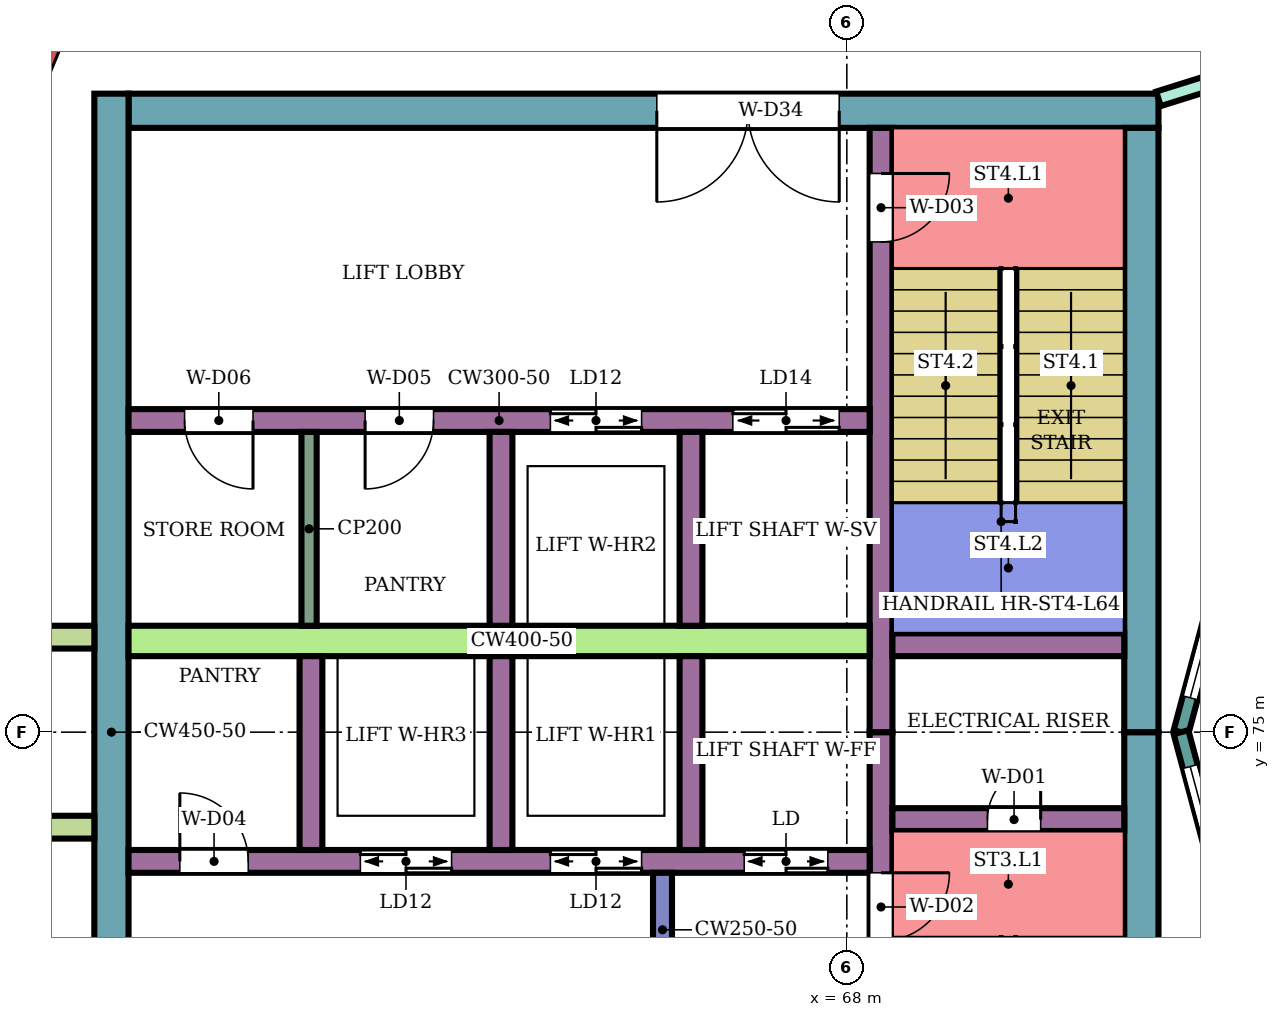
"""IFC4 building model, lengths in metres.
Left out: names, types, materials, properties, quantities, classifications, styles, units other than length and angle.
Written with IfcOpenShell. Run it as: python <this file> out.ifc"""

import sys

from ifc_helpers import new_model, si_unit, direction, frame, frame_2d, origin, place, context, subcontext, project, spatial, rectangle, extrude, element, fill, save


model = new_model("IFC4")
c1 = context("Model", 3, precision=1e-05, world=origin(), true_north=direction((0.0, 1.0)))
c2 = subcontext(c1, "Body", "Model", "MODEL_VIEW")
j1 = project(units=[si_unit("LENGTHUNIT", "METRE"), si_unit("PLANEANGLEUNIT", "RADIAN")], contexts=[c1])
p1 = place(None, origin())
s1 = spatial("IfcSite", under=j1, at=p1, CompositionType="ELEMENT")
p2 = place(p1, origin())
s2 = spatial("IfcBuilding", under=s1, at=p2, CompositionType="ELEMENT")
p3 = place(p2, frame((0.0, 0.0, 279.9)))
s3 = spatial("IfcBuildingStorey", under=s2, at=p3, CompositionType="ELEMENT", Elevation=279.9)
p4 = place(p3, frame((72.1, 83.175, 0.0), z_axis=(0.0, 0.0, 1.0), x_axis=(-1.0, 0.0, 0.0)))
e1 = element("IfcWall", 1, at=p4, inside=s3, PredefinedType="SHEAR", context=c2, shape_type="SweptSolid", body=[
    extrude(rectangle(XDim=13.55, YDim=0.45, at=frame_2d((6.775, 0.0))), origin(), (0.0, 0.0, 1.0), 3.88),
])
p5 = place(p4, frame((4.2, 0.0, 0.0)))
e2 = element("IfcOpeningElement", 2, at=p5, cuts=e1, PredefinedType="OPENING", context=c2, shape_type="SweptSolid", body=[
    extrude(rectangle(XDim=2.4, YDim=2.4, at=frame_2d((1.2, 1.2))), frame((0.0, 0.235, 0.0), z_axis=(0.0, -1.0, 0.0), x_axis=(1.0, 0.0, 0.0)), (0.0, 0.0, 1.0), 0.47),
])
for number, where, z_axis, x_axis in (
    (3, (71.875, 75.0, 0.0), (0.0, 0.0, 1.0), (0.0, -1.0, 0.0)),
    (4, (71.875, 82.95, 0.0), (0.0, 0.0, 1.0), (0.0, -1.0, 0.0)),
):
    element("IfcWall", number, at=place(p3, frame(where, z_axis=z_axis, x_axis=x_axis)), inside=s3, PredefinedType="SHEAR", context=c2, shape_type="SweptSolid", body=[
        extrude(rectangle(XDim=7.95, YDim=0.45, at=frame_2d((3.975, 0.0))), origin(), (0.0, 0.0, 1.0), 3.88),
    ])
p6 = place(p3, frame((58.325, 83.4, 0.0), z_axis=(0.0, 0.0, 1.0), x_axis=(0.0, -1.0, 0.0)))
e5 = element("IfcWall", 5, at=p6, inside=s3, PredefinedType="SHEAR", context=c2, shape_type="SweptSolid", body=[
    extrude(rectangle(XDim=16.8, YDim=0.45, at=frame_2d((8.4, 0.0))), origin(), (0.0, 0.0, 1.0), 3.88),
])
p7 = place(p3, frame((68.45, 75.0, 0.0), z_axis=(0.0, 0.0, 1.0), x_axis=(0.0, -1.0, 0.0)))
e6 = element("IfcWall", 6, at=p7, inside=s3, PredefinedType="SHEAR", context=c2, shape_type="SweptSolid", body=[
    extrude(rectangle(XDim=7.95, YDim=0.3, at=frame_2d((3.975, 0.0))), origin(), (0.0, 0.0, 1.0), 3.88),
])
p8 = place(p7, frame((1.85, 0.0, 0.0)))
e7 = element("IfcOpeningElement", 7, at=p8, cuts=e6, PredefinedType="OPENING", context=c2, shape_type="SweptSolid", body=[
    extrude(rectangle(XDim=0.9, YDim=2.1, at=frame_2d((0.45, 1.05))), frame((0.0, 0.16, 0.0), z_axis=(0.0, -1.0, 0.0), x_axis=(1.0, 0.0, 0.0)), (0.0, 0.0, 1.0), 0.32),
])
p9 = place(p3, frame((68.45, 82.95, 0.0), z_axis=(0.0, 0.0, 1.0), x_axis=(0.0, -1.0, 0.0)))
e8 = element("IfcWall", 8, at=p9, inside=s3, PredefinedType="SHEAR", context=c2, shape_type="SweptSolid", body=[
    extrude(rectangle(XDim=7.95, YDim=0.3, at=frame_2d((3.975, 0.0))), origin(), (0.0, 0.0, 1.0), 3.88),
])
p10 = place(p9, frame((0.6, 0.0, 0.0)))
e9 = element("IfcOpeningElement", 9, at=p10, cuts=e8, PredefinedType="OPENING", context=c2, shape_type="SweptSolid", body=[
    extrude(rectangle(XDim=0.9, YDim=2.1, at=frame_2d((0.45, 1.05))), frame((0.0, 0.16, 0.0), z_axis=(0.0, -1.0, 0.0), x_axis=(1.0, 0.0, 0.0)), (0.0, 0.0, 1.0), 0.32),
])
p11 = place(p3, frame((71.65, 73.85, 0.0), z_axis=(0.0, 0.0, 1.0), x_axis=(-1.0, 0.0, 0.0)))
e10 = element("IfcWall", 10, at=p11, inside=s3, PredefinedType="SHEAR", context=c2, shape_type="SweptSolid", body=[
    extrude(rectangle(XDim=3.05, YDim=0.3, at=frame_2d((1.525, 0.0))), origin(), (0.0, 0.0, 1.0), 3.88),
])
p12 = place(p11, frame((1.1, 0.0, 0.0)))
e11 = element("IfcOpeningElement", 11, at=p12, cuts=e10, PredefinedType="OPENING", context=c2, shape_type="SweptSolid", body=[
    extrude(rectangle(XDim=0.7, YDim=2.0, at=frame_2d((0.35, 1.0))), frame((0.0, 0.16, 0.0), z_axis=(0.0, -1.0, 0.0), x_axis=(1.0, 0.0, 0.0)), (0.0, 0.0, 1.0), 0.32),
])
p13 = place(p3, frame((71.65, 76.15, 0.0), z_axis=(0.0, 0.0, 1.0), x_axis=(-1.0, 0.0, 0.0)))
e12 = element("IfcWall", 12, at=p13, inside=s3, PredefinedType="SHEAR", context=c2, shape_type="SweptSolid", body=[
    extrude(rectangle(XDim=3.05, YDim=0.3, at=frame_2d((1.525, 0.0))), origin(), (0.0, 0.0, 1.0), 3.88),
])
p14 = place(p3, frame((68.3, 73.3, 0.0), z_axis=(0.0, 0.0, 1.0), x_axis=(-1.0, 0.0, 0.0)))
e13 = element("IfcWall", 13, at=p14, inside=s3, PredefinedType="SHEAR", context=c2, shape_type="SweptSolid", body=[
    extrude(rectangle(XDim=9.75, YDim=0.3, at=frame_2d((4.875, 0.0))), origin(), (0.0, 0.0, 1.0), 3.88),
])
p15 = place(p14, frame((0.55, 0.0, 0.0)))
e14 = element("IfcOpeningElement", 14, at=p15, cuts=e13, PredefinedType="OPENING", context=c2, shape_type="SweptSolid", body=[
    extrude(rectangle(XDim=1.1, YDim=2.1, at=frame_2d((0.55, 1.05))), frame((0.0, 0.16, 0.0), z_axis=(0.0, -1.0, 0.0), x_axis=(1.0, 0.0, 0.0)), (0.0, 0.0, 1.0), 0.32),
])
p16 = place(p14, frame((3.0, 0.0, 0.0)))
e15 = element("IfcOpeningElement", 15, at=p16, cuts=e13, PredefinedType="OPENING", context=c2, shape_type="SweptSolid", body=[
    extrude(rectangle(XDim=1.2, YDim=2.1, at=frame_2d((0.6, 1.05))), frame((0.0, 0.16, 0.0), z_axis=(0.0, -1.0, 0.0), x_axis=(1.0, 0.0, 0.0)), (0.0, 0.0, 1.0), 0.32),
])
p17 = place(p14, frame((5.5, 0.0, 0.0)))
e16 = element("IfcOpeningElement", 16, at=p17, cuts=e13, PredefinedType="OPENING", context=c2, shape_type="SweptSolid", body=[
    extrude(rectangle(XDim=1.2, YDim=2.1, at=frame_2d((0.6, 1.05))), frame((0.0, 0.16, 0.0), z_axis=(0.0, -1.0, 0.0), x_axis=(1.0, 0.0, 0.0)), (0.0, 0.0, 1.0), 0.32),
])
p18 = place(p14, frame((8.175, 0.0, 0.0)))
e17 = element("IfcOpeningElement", 17, at=p18, cuts=e13, PredefinedType="OPENING", context=c2, shape_type="SweptSolid", body=[
    extrude(rectangle(XDim=0.9, YDim=2.1, at=frame_2d((0.45, 1.05))), frame((0.0, 0.16, 0.0), z_axis=(0.0, -1.0, 0.0), x_axis=(1.0, 0.0, 0.0)), (0.0, 0.0, 1.0), 0.32),
])
p19 = place(p3, frame((68.3, 76.2, 0.0), z_axis=(0.0, 0.0, 1.0), x_axis=(-1.0, 0.0, 0.0)))
e18 = element("IfcWall", 18, at=p19, inside=s3, PredefinedType="SHEAR", context=c2, shape_type="SweptSolid", body=[
    extrude(rectangle(XDim=9.75, YDim=0.4, at=frame_2d((4.875, 0.0))), origin(), (0.0, 0.0, 1.0), 3.88),
])
p20 = place(p3, frame((68.3, 79.1, 0.0), z_axis=(0.0, 0.0, 1.0), x_axis=(-1.0, 0.0, 0.0)))
e19 = element("IfcWall", 19, at=p20, inside=s3, PredefinedType="SHEAR", context=c2, shape_type="SweptSolid", body=[
    extrude(rectangle(XDim=9.75, YDim=0.3, at=frame_2d((4.875, 0.0))), origin(), (0.0, 0.0, 1.0), 3.88),
])
p21 = place(p20, frame((0.4, 0.0, 0.0)))
e20 = element("IfcOpeningElement", 20, at=p21, cuts=e19, PredefinedType="OPENING", context=c2, shape_type="SweptSolid", body=[
    extrude(rectangle(XDim=1.4, YDim=2.1, at=frame_2d((0.7, 1.05))), frame((0.0, 0.16, 0.0), z_axis=(0.0, -1.0, 0.0), x_axis=(1.0, 0.0, 0.0)), (0.0, 0.0, 1.0), 0.32),
])
p22 = place(p20, frame((3.0, 0.0, 0.0)))
e21 = element("IfcOpeningElement", 21, at=p22, cuts=e19, PredefinedType="OPENING", context=c2, shape_type="SweptSolid", body=[
    extrude(rectangle(XDim=1.2, YDim=2.1, at=frame_2d((0.6, 1.05))), frame((0.0, 0.16, 0.0), z_axis=(0.0, -1.0, 0.0), x_axis=(1.0, 0.0, 0.0)), (0.0, 0.0, 1.0), 0.32),
])
p23 = place(p20, frame((5.738, 0.0, 0.0)))
e22 = element("IfcOpeningElement", 22, at=p23, cuts=e19, PredefinedType="OPENING", context=c2, shape_type="SweptSolid", body=[
    extrude(rectangle(XDim=0.9, YDim=2.1, at=frame_2d((0.45, 1.05))), frame((0.0, 0.16, 0.0), z_axis=(0.0, -1.0, 0.0), x_axis=(1.0, 0.0, 0.0)), (0.0, 0.0, 1.0), 0.32),
])
p24 = place(p20, frame((8.113, 0.0, 0.0)))
e23 = element("IfcOpeningElement", 23, at=p24, cuts=e19, PredefinedType="OPENING", context=c2, shape_type="SweptSolid", body=[
    extrude(rectangle(XDim=0.9, YDim=2.1, at=frame_2d((0.45, 1.05))), frame((0.0, 0.16, 0.0), z_axis=(0.0, -1.0, 0.0), x_axis=(1.0, 0.0, 0.0)), (0.0, 0.0, 1.0), 0.32),
])
for number, where, z_axis, x_axis in (
    (24, (65.95, 76.0, 0.0), (0.0, 0.0, 1.0), (0.0, -1.0, 0.0)),
    (25, (63.45, 76.0, 0.0), (0.0, 0.0, 1.0), (0.0, -1.0, 0.0)),
    (26, (60.95, 76.0, 0.0), (0.0, 0.0, 1.0), (0.0, -1.0, 0.0)),
    (27, (65.95, 78.95, 0.0), (0.0, 0.0, 1.0), (0.0, -1.0, 0.0)),
    (28, (63.45, 78.95, 0.0), (0.0, 0.0, 1.0), (0.0, -1.0, 0.0)),
):
    element("IfcWall", number, at=place(p3, frame(where, z_axis=z_axis, x_axis=x_axis)), inside=s3, PredefinedType="SHEAR", context=c2, shape_type="SweptSolid", body=[
        extrude(rectangle(XDim=2.55, YDim=0.3, at=frame_2d((1.275, 0.0))), origin(), (0.0, 0.0, 1.0), 3.88),
    ])
p25 = place(p3, frame((65.575, 73.15, 0.0), z_axis=(0.0, 0.0, 1.0), x_axis=(0.0, -1.0, 0.0)))
e29 = element("IfcWall", 29, at=p25, inside=s3, PredefinedType="SHEAR", context=c2, shape_type="SweptSolid", body=[
    extrude(rectangle(XDim=1.5, YDim=0.25, at=frame_2d((0.75, 0.0))), origin(), (0.0, 0.0, 1.0), 3.88),
])
for number, where, z_axis, x_axis in (
    (30, (58.1, 76.25, 0.0), (0.0, 0.0, 1.0), (-1.0, 0.0, 0.0)),
    (31, (58.1, 73.75, 0.0), (0.0, 0.0, 1.0), (-1.0, 0.0, 0.0)),
):
    element("IfcWall", number, at=place(p3, frame(where, z_axis=z_axis, x_axis=x_axis)), inside=s3, PredefinedType="NOTDEFINED", context=c2, shape_type="SweptSolid", body=[
        extrude(rectangle(XDim=2.416, YDim=0.3, at=frame_2d((1.208, 0.0))), origin(), (0.0, 0.0, 1.0), 4.2),
    ])
p26 = place(p3, frame((73.415, 78.802, 0.0), z_axis=(0.0, 0.0, 1.0), x_axis=(-0.258789828301, -0.965933654434, 0.0)))
e32 = element("IfcWall", 32, at=p26, inside=s3, PredefinedType="NOTDEFINED", context=c2, shape_type="SweptSolid", body=[
    extrude(rectangle(XDim=3.936, YDim=0.2, at=frame_2d((1.968, 0.0))), origin(), (0.0, 0.0, 1.0), 4.2),
])
p27 = place(p26, frame((0.468, 0.0, 0.9)))
e33 = element("IfcOpeningElement", 33, at=p27, cuts=e32, PredefinedType="OPENING", context=c2, shape_type="SweptSolid", body=[
    extrude(rectangle(XDim=3.0, YDim=2.3, at=frame_2d((1.5, 1.15))), frame((0.0, 0.11, 0.0), z_axis=(0.0, -1.0, 0.0), x_axis=(1.0, 0.0, 0.0)), (0.0, 0.0, 1.0), 0.22),
])
p28 = place(p3, frame((72.396, 75.0, 0.0), z_axis=(0.0, 0.0, 1.0), x_axis=(0.258789828301, -0.965933654434, 0.0)))
e34 = element("IfcWall", 34, at=p28, inside=s3, PredefinedType="NOTDEFINED", context=c2, shape_type="SweptSolid", body=[
    extrude(rectangle(XDim=3.936, YDim=0.2, at=frame_2d((1.968, 0.0))), origin(), (0.0, 0.0, 1.0), 4.2),
])
p29 = place(p28, frame((0.468, 0.0, 0.9)))
e35 = element("IfcOpeningElement", 35, at=p29, cuts=e34, PredefinedType="OPENING", context=c2, shape_type="SweptSolid", body=[
    extrude(rectangle(XDim=3.0, YDim=2.3, at=frame_2d((1.5, 1.15))), frame((0.0, 0.11, 0.0), z_axis=(0.0, -1.0, 0.0), x_axis=(1.0, 0.0, 0.0)), (0.0, 0.0, 1.0), 0.22),
])
p30 = place(p3, frame((72.1, 83.332, 0.0), z_axis=(0.0, 0.0, 1.0), x_axis=(0.954233106619, 0.299063836383, 0.0)))
e36 = element("IfcWall", 36, at=p30, inside=s3, PredefinedType="PARTITIONING", context=c2, shape_type="SweptSolid", body=[
    extrude(rectangle(XDim=2.414, YDim=0.2, at=frame_2d((1.207, 0.0))), origin(), (0.0, 0.0, 1.0), 3.75),
])
p31 = place(p30, frame((0.762, 0.0, 0.0)))
e37 = element("IfcOpeningElement", 37, at=p31, cuts=e36, PredefinedType="OPENING", context=c2, shape_type="SweptSolid", body=[
    extrude(rectangle(XDim=0.9, YDim=2.1, at=frame_2d((0.45, 1.05))), frame((0.0, 0.11, 0.0), z_axis=(0.0, -1.0, 0.0), x_axis=(1.0, 0.0, 0.0)), (0.0, 0.0, 1.0), 0.22),
])
p32 = place(p3, frame((60.925, 78.95, 0.0), z_axis=(0.0, 0.0, 1.0), x_axis=(0.0, -1.0, 0.0)))
e38 = element("IfcWall", 38, at=p32, inside=s3, PredefinedType="PARTITIONING", context=c2, shape_type="SweptSolid", body=[
    extrude(rectangle(XDim=2.55, YDim=0.2, at=frame_2d((1.275, 0.0))), origin(), (0.0, 0.0, 1.0), 3.88),
])
p33 = place(p27, origin())
e39 = element("IfcWindow", 39, at=p33, inside=s3, PartitioningType="SINGLE_PANEL", PredefinedType="WINDOW", context=c2, shape_type="SweptSolid", body=[
    extrude(rectangle(XDim=3.0, YDim=2.3, at=frame_2d((1.5, 1.15))), frame((0.0, 0.03, 0.0), z_axis=(0.0, -1.0, 0.0), x_axis=(1.0, 0.0, 0.0)), (0.0, 0.0, 1.0), 0.06),
])
fill(e33, e39)
p34 = place(p29, origin())
e40 = element("IfcWindow", 40, at=p34, inside=s3, PartitioningType="SINGLE_PANEL", PredefinedType="WINDOW", context=c2, shape_type="SweptSolid", body=[
    extrude(rectangle(XDim=3.0, YDim=2.3, at=frame_2d((1.5, 1.15))), frame((0.0, 0.03, 0.0), z_axis=(0.0, -1.0, 0.0), x_axis=(1.0, 0.0, 0.0)), (0.0, 0.0, 1.0), 0.06),
])
fill(e35, e40)
p35 = place(p12, frame((0.7, 0.0, 0.0), z_axis=(0.0, 0.0, 1.0), x_axis=(-1.0, 0.0, 0.0)))
e41 = element("IfcDoor", 41, at=p35, inside=s3, OperationType="SINGLE_SWING_RIGHT", PredefinedType="DOOR", context=c2, shape_type="SweptSolid", body=[
    extrude(rectangle(XDim=0.7, YDim=2.0, at=frame_2d((0.35, 1.0))), frame((0.0, 0.025, 0.0), z_axis=(0.0, -1.0, 0.0), x_axis=(1.0, 0.0, 0.0)), (0.0, 0.0, 1.0), 0.05),
])
fill(e11, e41)
p36 = place(p8, origin())
e42 = element("IfcDoor", 42, at=p36, inside=s3, OperationType="SINGLE_SWING_LEFT", PredefinedType="DOOR", context=c2, shape_type="SweptSolid", body=[
    extrude(rectangle(XDim=0.9, YDim=2.1, at=frame_2d((0.45, 1.05))), frame((0.0, 0.025, 0.0), z_axis=(0.0, -1.0, 0.0), x_axis=(1.0, 0.0, 0.0)), (0.0, 0.0, 1.0), 0.05),
])
fill(e7, e42)
p37 = place(p10, origin())
e43 = element("IfcDoor", 43, at=p37, inside=s3, OperationType="SINGLE_SWING_LEFT", PredefinedType="DOOR", context=c2, shape_type="SweptSolid", body=[
    extrude(rectangle(XDim=0.9, YDim=2.1, at=frame_2d((0.45, 1.05))), frame((0.0, 0.025, 0.0), z_axis=(0.0, -1.0, 0.0), x_axis=(1.0, 0.0, 0.0)), (0.0, 0.0, 1.0), 0.05),
])
fill(e9, e43)
p38 = place(p15, origin())
e44 = element("IfcDoor", 44, at=p38, inside=s3, OperationType="DOUBLE_DOOR_SLIDING", PredefinedType="DOOR", context=c2, shape_type="SweptSolid", body=[
    extrude(rectangle(XDim=1.1, YDim=2.1, at=frame_2d((0.55, 1.05))), frame((0.0, 0.025, 0.0), z_axis=(0.0, -1.0, 0.0), x_axis=(1.0, 0.0, 0.0)), (0.0, 0.0, 1.0), 0.05),
])
fill(e14, e44)
p39 = place(p16, origin())
e45 = element("IfcDoor", 45, at=p39, inside=s3, OperationType="DOUBLE_DOOR_SLIDING", PredefinedType="DOOR", context=c2, shape_type="SweptSolid", body=[
    extrude(rectangle(XDim=1.2, YDim=2.1, at=frame_2d((0.6, 1.05))), frame((0.0, 0.025, 0.0), z_axis=(0.0, -1.0, 0.0), x_axis=(1.0, 0.0, 0.0)), (0.0, 0.0, 1.0), 0.05),
])
fill(e15, e45)
p40 = place(p17, origin())
e46 = element("IfcDoor", 46, at=p40, inside=s3, OperationType="DOUBLE_DOOR_SLIDING", PredefinedType="DOOR", context=c2, shape_type="SweptSolid", body=[
    extrude(rectangle(XDim=1.2, YDim=2.1, at=frame_2d((0.6, 1.05))), frame((0.0, 0.025, 0.0), z_axis=(0.0, -1.0, 0.0), x_axis=(1.0, 0.0, 0.0)), (0.0, 0.0, 1.0), 0.05),
])
fill(e16, e46)
p41 = place(p18, frame((0.9, 0.0, 0.0), z_axis=(0.0, 0.0, 1.0), x_axis=(-1.0, 0.0, 0.0)))
e47 = element("IfcDoor", 47, at=p41, inside=s3, OperationType="SINGLE_SWING_LEFT", PredefinedType="DOOR", context=c2, shape_type="SweptSolid", body=[
    extrude(rectangle(XDim=0.9, YDim=2.1, at=frame_2d((0.45, 1.05))), frame((0.0, 0.025, 0.0), z_axis=(0.0, -1.0, 0.0), x_axis=(1.0, 0.0, 0.0)), (0.0, 0.0, 1.0), 0.05),
])
fill(e17, e47)
p42 = place(p21, origin())
e48 = element("IfcDoor", 48, at=p42, inside=s3, OperationType="DOUBLE_DOOR_SLIDING", PredefinedType="DOOR", context=c2, shape_type="SweptSolid", body=[
    extrude(rectangle(XDim=1.4, YDim=2.1, at=frame_2d((0.7, 1.05))), frame((0.0, 0.025, 0.0), z_axis=(0.0, -1.0, 0.0), x_axis=(1.0, 0.0, 0.0)), (0.0, 0.0, 1.0), 0.05),
])
fill(e20, e48)
p43 = place(p22, origin())
e49 = element("IfcDoor", 49, at=p43, inside=s3, OperationType="DOUBLE_DOOR_SLIDING", PredefinedType="DOOR", context=c2, shape_type="SweptSolid", body=[
    extrude(rectangle(XDim=1.2, YDim=2.1, at=frame_2d((0.6, 1.05))), frame((0.0, 0.025, 0.0), z_axis=(0.0, -1.0, 0.0), x_axis=(1.0, 0.0, 0.0)), (0.0, 0.0, 1.0), 0.05),
])
fill(e21, e49)
p44 = place(p23, origin())
e50 = element("IfcDoor", 50, at=p44, inside=s3, OperationType="SINGLE_SWING_RIGHT", PredefinedType="DOOR", context=c2, shape_type="SweptSolid", body=[
    extrude(rectangle(XDim=0.9, YDim=2.1, at=frame_2d((0.45, 1.05))), frame((0.0, 0.025, 0.0), z_axis=(0.0, -1.0, 0.0), x_axis=(1.0, 0.0, 0.0)), (0.0, 0.0, 1.0), 0.05),
])
fill(e22, e50)
p45 = place(p24, origin())
e51 = element("IfcDoor", 51, at=p45, inside=s3, OperationType="SINGLE_SWING_LEFT", PredefinedType="DOOR", context=c2, shape_type="SweptSolid", body=[
    extrude(rectangle(XDim=0.9, YDim=2.1, at=frame_2d((0.45, 1.05))), frame((0.0, 0.025, 0.0), z_axis=(0.0, -1.0, 0.0), x_axis=(1.0, 0.0, 0.0)), (0.0, 0.0, 1.0), 0.05),
])
fill(e23, e51)
p46 = place(p5, origin())
e52 = element("IfcDoor", 52, at=p46, inside=s3, OperationType="DOUBLE_DOOR_SINGLE_SWING", PredefinedType="DOOR", context=c2, shape_type="SweptSolid", body=[
    extrude(rectangle(XDim=2.4, YDim=2.4, at=frame_2d((1.2, 1.2))), frame((0.0, 0.025, 0.0), z_axis=(0.0, -1.0, 0.0), x_axis=(1.0, 0.0, 0.0)), (0.0, 0.0, 1.0), 0.05),
])
fill(e2, e52)
save(model, sys.argv[1])
